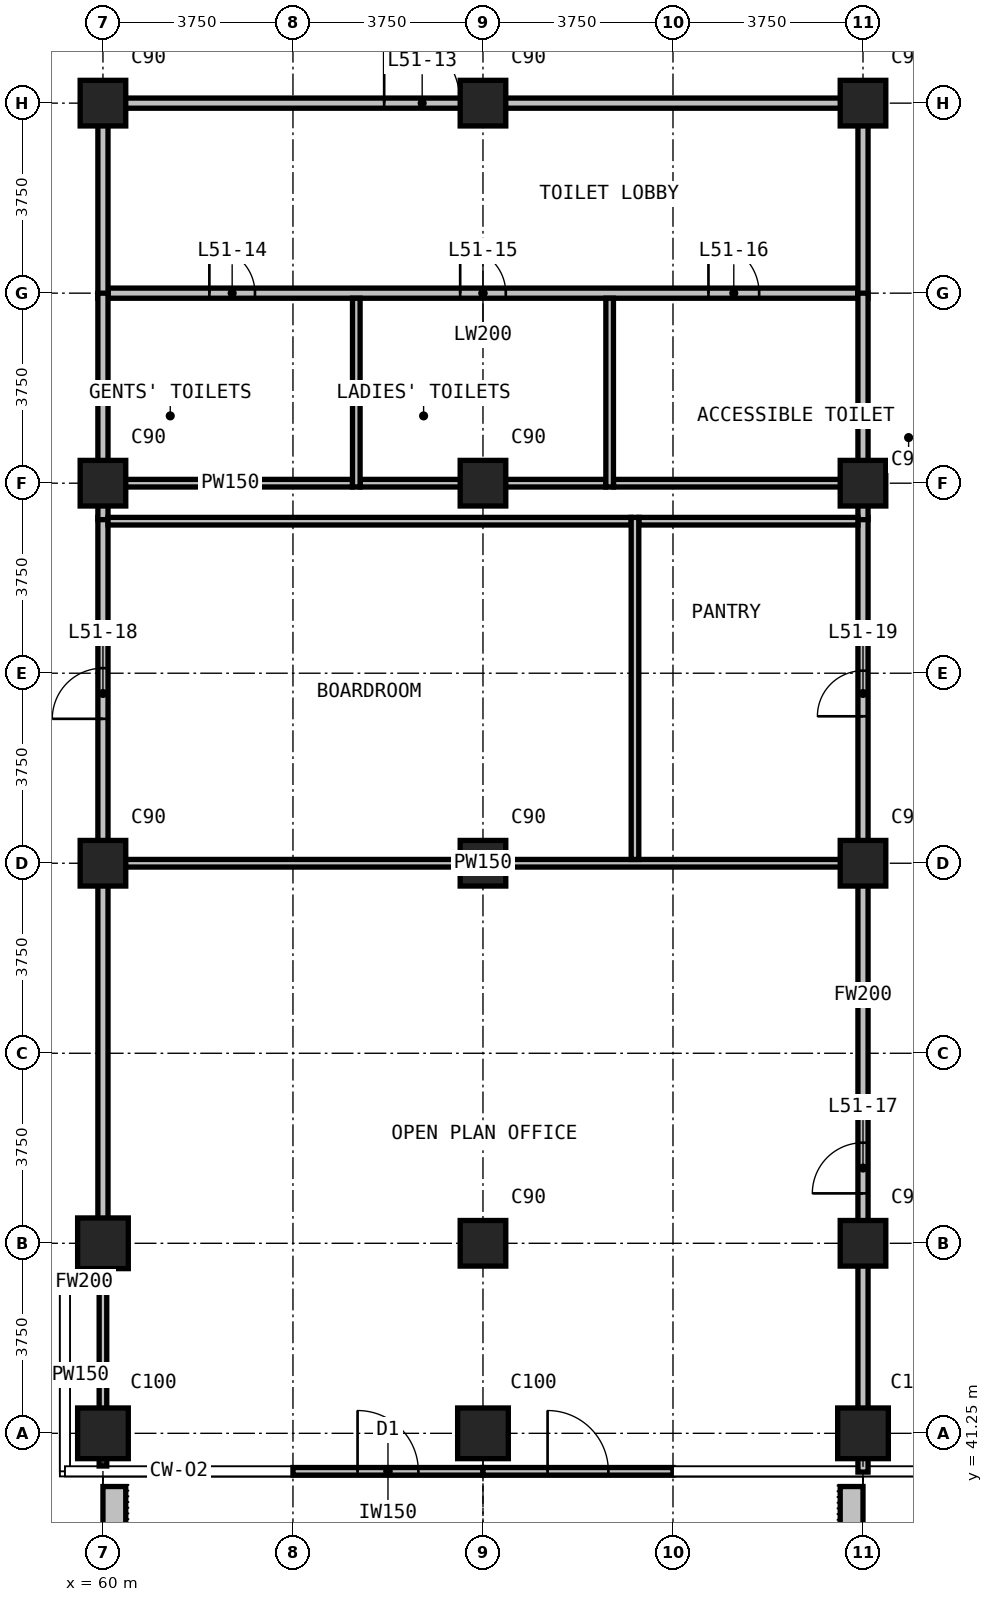
"""IFC4 building model, lengths in metres.
Left out: names, types, materials, properties, quantities, classifications, styles, units other than length and angle.
Written with IfcOpenShell. Run it as: python <this file> out.ifc"""

import sys

from ifc_helpers import new_model, si_unit, direction, frame, frame_2d, origin, origin_2d, place, context, subcontext, project, spatial, rectangle, extrude, element, fill, save


model = new_model("IFC4")
c1 = context("Model", 3, precision=1e-05, world=origin(), true_north=direction((0.0, 1.0)))
c2 = subcontext(c1, "Body", "Model", "MODEL_VIEW")
j1 = project(units=[si_unit("LENGTHUNIT", "METRE"), si_unit("PLANEANGLEUNIT", "RADIAN")], contexts=[c1])
p1 = place(None, origin())
s1 = spatial("IfcSite", under=j1, at=p1, CompositionType="ELEMENT")
p2 = place(p1, origin())
s2 = spatial("IfcBuilding", under=s1, at=p2, CompositionType="ELEMENT")
p3 = place(p2, frame((0.0, 0.0, 199.5)))
s3 = spatial("IfcBuildingStorey", under=s2, at=p3, CompositionType="ELEMENT", Elevation=199.5)
for number, where, z_axis, x_axis in (
    (1, (60.0, 41.25, 0.0), (0.0, 0.0, 1.0), (1.0, 0.0, 0.0)),
    (2, (60.0, 45.0, 0.0), (0.0, 0.0, 1.0), (1.0, 0.0, 0.0)),
):
    element("IfcColumn", number, at=place(p3, frame(where, z_axis=z_axis, x_axis=x_axis)), inside=s3, PredefinedType="COLUMN", context=c2, shape_type="SweptSolid", body=[
        extrude(rectangle(XDim=1.0, YDim=1.0, at=origin_2d()), origin(), (0.0, 0.0, 1.0), 3.6),
    ])
for number, where, z_axis, x_axis in (
    (3, (60.0, 52.5, 0.0), (0.0, 0.0, 1.0), (1.0, 0.0, 0.0)),
    (4, (60.0, 60.0, 0.0), (0.0, 0.0, 1.0), (1.0, 0.0, 0.0)),
    (5, (60.0, 67.5, 0.0), (0.0, 0.0, 1.0), (1.0, 0.0, 0.0)),
):
    element("IfcColumn", number, at=place(p3, frame(where, z_axis=z_axis, x_axis=x_axis)), inside=s3, PredefinedType="COLUMN", context=c2, shape_type="SweptSolid", body=[
        extrude(rectangle(XDim=0.9, YDim=0.9, at=origin_2d()), origin(), (0.0, 0.0, 1.0), 3.6),
    ])
p4 = place(p3, frame((67.5, 41.25, 0.0), z_axis=(0.0, 0.0, 1.0), x_axis=(1.0, 0.0, 0.0)))
e6 = element("IfcColumn", 6, at=p4, inside=s3, PredefinedType="COLUMN", context=c2, shape_type="SweptSolid", body=[
    extrude(rectangle(XDim=1.0, YDim=1.0, at=origin_2d()), origin(), (0.0, 0.0, 1.0), 3.6),
])
for number, where, z_axis, x_axis in (
    (7, (67.5, 45.0, 0.0), (0.0, 0.0, 1.0), (1.0, 0.0, 0.0)),
    (8, (67.5, 52.5, 0.0), (0.0, 0.0, 1.0), (1.0, 0.0, 0.0)),
    (9, (67.5, 60.0, 0.0), (0.0, 0.0, 1.0), (1.0, 0.0, 0.0)),
    (10, (67.5, 67.5, 0.0), (0.0, 0.0, 1.0), (1.0, 0.0, 0.0)),
):
    element("IfcColumn", number, at=place(p3, frame(where, z_axis=z_axis, x_axis=x_axis)), inside=s3, PredefinedType="COLUMN", context=c2, shape_type="SweptSolid", body=[
        extrude(rectangle(XDim=0.9, YDim=0.9, at=origin_2d()), origin(), (0.0, 0.0, 1.0), 3.6),
    ])
p5 = place(p3, frame((75.0, 41.25, 0.0), z_axis=(0.0, 0.0, 1.0), x_axis=(1.0, 0.0, 0.0)))
e11 = element("IfcColumn", 11, at=p5, inside=s3, PredefinedType="COLUMN", context=c2, shape_type="SweptSolid", body=[
    extrude(rectangle(XDim=1.0, YDim=1.0, at=origin_2d()), origin(), (0.0, 0.0, 1.0), 3.6),
])
for number, where, z_axis, x_axis in (
    (12, (75.0, 45.0, 0.0), (0.0, 0.0, 1.0), (1.0, 0.0, 0.0)),
    (13, (75.0, 52.5, 0.0), (0.0, 0.0, 1.0), (1.0, 0.0, 0.0)),
    (14, (75.0, 60.0, 0.0), (0.0, 0.0, 1.0), (1.0, 0.0, 0.0)),
    (15, (75.0, 67.5, 0.0), (0.0, 0.0, 1.0), (1.0, 0.0, 0.0)),
):
    element("IfcColumn", number, at=place(p3, frame(where, z_axis=z_axis, x_axis=x_axis)), inside=s3, PredefinedType="COLUMN", context=c2, shape_type="SweptSolid", body=[
        extrude(rectangle(XDim=0.9, YDim=0.9, at=origin_2d()), origin(), (0.0, 0.0, 1.0), 3.6),
    ])
p6 = place(p3, frame((63.75, 40.5, 0.0), z_axis=(0.0, 0.0, 1.0), x_axis=(1.0, 0.0, 0.0)))
e16 = element("IfcWall", 16, at=p6, inside=s3, PredefinedType="SOLIDWALL", context=c2, shape_type="SweptSolid", body=[
    extrude(rectangle(XDim=3.75, YDim=0.15, at=frame_2d((1.875, 0.0))), origin(), (0.0, 0.0, 1.0), 3.3),
])
p7 = place(p6, frame((1.275, 0.0, 0.0)))
e17 = element("IfcOpeningElement", 17, at=p7, cuts=e16, PredefinedType="OPENING", context=c2, shape_type="SweptSolid", body=[
    extrude(rectangle(XDim=1.2, YDim=2.4, at=frame_2d((0.6, 1.2))), frame((0.0, 0.085, 0.0), z_axis=(0.0, -1.0, 0.0), x_axis=(1.0, 0.0, 0.0)), (0.0, 0.0, 1.0), 0.17),
])
p8 = place(p3, frame((67.5, 40.5, 0.0), z_axis=(0.0, 0.0, 1.0), x_axis=(1.0, 0.0, 0.0)))
e18 = element("IfcWall", 18, at=p8, inside=s3, PredefinedType="SOLIDWALL", context=c2, shape_type="SweptSolid", body=[
    extrude(rectangle(XDim=3.75, YDim=0.15, at=frame_2d((1.875, 0.0))), origin(), (0.0, 0.0, 1.0), 3.3),
])
p9 = place(p8, frame((1.275, 0.0, 0.0)))
e19 = element("IfcOpeningElement", 19, at=p9, cuts=e18, PredefinedType="OPENING", context=c2, shape_type="SweptSolid", body=[
    extrude(rectangle(XDim=1.2, YDim=2.4, at=frame_2d((0.6, 1.2))), frame((0.0, 0.085, 0.0), z_axis=(0.0, -1.0, 0.0), x_axis=(1.0, 0.0, 0.0)), (0.0, 0.0, 1.0), 0.17),
])
for number, where, z_axis, x_axis in (
    (20, (60.225, 40.2, 0.0), (0.0, 0.0, 1.0), (0.0, -1.0, 0.0)),
    (21, (74.775, 40.2, 0.0), (0.0, 0.0, 1.0), (0.0, -1.0, 0.0)),
):
    element("IfcWall", number, at=place(p3, frame(where, z_axis=z_axis, x_axis=x_axis)), inside=s3, PredefinedType="USERDEFINED", context=c2, shape_type="SweptSolid", body=[
        extrude(rectangle(XDim=2.35, YDim=0.45, at=frame_2d((1.175, 0.0))), origin(), (0.0, 0.0, 1.0), 1.1),
    ])
p10 = place(p3, frame((60.1, 63.75, 0.0), z_axis=(0.0, 0.0, 1.0), x_axis=(1.0, 0.0, 0.0)))
e22 = element("IfcWall", 22, at=p10, inside=s3, PredefinedType="PARTITIONING", context=c2, shape_type="SweptSolid", body=[
    extrude(rectangle(XDim=14.8, YDim=0.2, at=frame_2d((7.4, 0.0))), origin(), (0.0, 0.0, 1.0), 3.3),
])
p11 = place(p10, frame((2.0, 0.0, 0.0)))
e23 = element("IfcOpeningElement", 23, at=p11, cuts=e22, PredefinedType="OPENING", context=c2, shape_type="SweptSolid", body=[
    extrude(rectangle(XDim=0.9, YDim=2.2, at=frame_2d((0.45, 1.1))), frame((0.0, 0.11, 0.0), z_axis=(0.0, -1.0, 0.0), x_axis=(1.0, 0.0, 0.0)), (0.0, 0.0, 1.0), 0.22),
])
p12 = place(p10, frame((6.95, 0.0, 0.0)))
e24 = element("IfcOpeningElement", 24, at=p12, cuts=e22, PredefinedType="OPENING", context=c2, shape_type="SweptSolid", body=[
    extrude(rectangle(XDim=0.9, YDim=2.2, at=frame_2d((0.45, 1.1))), frame((0.0, 0.11, 0.0), z_axis=(0.0, -1.0, 0.0), x_axis=(1.0, 0.0, 0.0)), (0.0, 0.0, 1.0), 0.22),
])
p13 = place(p10, frame((11.85, 0.0, 0.0)))
e25 = element("IfcOpeningElement", 25, at=p13, cuts=e22, PredefinedType="OPENING", context=c2, shape_type="SweptSolid", body=[
    extrude(rectangle(XDim=1.0, YDim=2.2, at=frame_2d((0.5, 1.1))), frame((0.0, 0.11, 0.0), z_axis=(0.0, -1.0, 0.0), x_axis=(1.0, 0.0, 0.0)), (0.0, 0.0, 1.0), 0.22),
])
p14 = place(p3, frame((60.1, 67.5, 0.0), z_axis=(0.0, 0.0, 1.0), x_axis=(1.0, 0.0, 0.0)))
e26 = element("IfcWall", 26, at=p14, inside=s3, PredefinedType="PARTITIONING", context=c2, shape_type="SweptSolid", body=[
    extrude(rectangle(XDim=14.8, YDim=0.2, at=frame_2d((7.4, 0.0))), origin(), (0.0, 0.0, 1.0), 3.3),
])
p15 = place(p14, frame((5.45, 0.0, 0.0)))
e27 = element("IfcOpeningElement", 27, at=p15, cuts=e26, PredefinedType="OPENING", context=c2, shape_type="SweptSolid", body=[
    extrude(rectangle(XDim=1.5, YDim=2.2, at=frame_2d((0.75, 1.1))), frame((0.0, 0.11, 0.0), z_axis=(0.0, -1.0, 0.0), x_axis=(1.0, 0.0, 0.0)), (0.0, 0.0, 1.0), 0.22),
])
for number, where, z_axis, x_axis in (
    (28, (60.0, 63.65, 0.0), (0.0, 0.0, 1.0), (0.0, 1.0, 0.0)),
    (29, (75.0, 63.65, 0.0), (0.0, 0.0, 1.0), (0.0, 1.0, 0.0)),
):
    element("IfcWall", number, at=place(p3, frame(where, z_axis=z_axis, x_axis=x_axis)), inside=s3, PredefinedType="PARTITIONING", context=c2, shape_type="SweptSolid", body=[
        extrude(rectangle(XDim=3.95, YDim=0.2, at=frame_2d((1.975, 0.0))), origin(), (0.0, 0.0, 1.0), 3.3),
    ])
p16 = place(p3, frame((59.355, 44.235, 0.0), z_axis=(0.0, 0.0, 1.0), x_axis=(1.0, 0.0, 0.0)))
e30 = element("IfcWall", 30, at=p16, inside=s3, PredefinedType="PARTITIONING", context=c2, shape_type="SweptSolid", body=[
    extrude(rectangle(XDim=0.545, YDim=0.2, at=frame_2d((0.272, 0.0))), origin(), (0.0, 0.0, 1.0), 3.3),
])
p17 = place(p3, frame((60.0, 44.135, 0.0), z_axis=(0.0, 0.0, 1.0), x_axis=(0.0, 1.0, 0.0)))
e31 = element("IfcWall", 31, at=p17, inside=s3, PredefinedType="PARTITIONING", context=c2, shape_type="SweptSolid", body=[
    extrude(rectangle(XDim=15.19, YDim=0.2, at=frame_2d((7.595, 0.0))), origin(), (0.0, 0.0, 1.0), 3.3),
])
p18 = place(p17, frame((11.215, 0.0, 0.0)))
e32 = element("IfcOpeningElement", 32, at=p18, cuts=e31, PredefinedType="OPENING", context=c2, shape_type="SweptSolid", body=[
    extrude(rectangle(XDim=1.0, YDim=2.2, at=frame_2d((0.5, 1.1))), frame((0.0, 0.11, 0.0), z_axis=(0.0, -1.0, 0.0), x_axis=(1.0, 0.0, 0.0)), (0.0, 0.0, 1.0), 0.22),
])
p19 = place(p3, frame((60.0, 59.28, 0.0), z_axis=(0.0, 0.0, 1.0), x_axis=(0.0, 1.0, 0.0)))
e33 = element("IfcWall", 33, at=p19, inside=s3, PredefinedType="PARTITIONING", context=c2, shape_type="SweptSolid", body=[
    extrude(rectangle(XDim=0.795, YDim=0.2, at=frame_2d((0.397, 0.0))), origin(), (0.0, 0.0, 1.0), 3.3),
])
p20 = place(p3, frame((60.0, 60.0, 0.0), z_axis=(0.0, 0.0, 1.0), x_axis=(0.0, 1.0, 0.0)))
e34 = element("IfcWall", 34, at=p20, inside=s3, PredefinedType="PARTITIONING", context=c2, shape_type="SweptSolid", body=[
    extrude(rectangle(XDim=3.75, YDim=0.2, at=frame_2d((1.875, 0.0))), origin(), (0.0, 0.0, 1.0), 3.3),
])
p21 = place(p3, frame((75.0, 40.485, 0.0), z_axis=(0.0, 0.0, 1.0), x_axis=(0.0, 1.0, 0.0)))
e35 = element("IfcWall", 35, at=p21, inside=s3, PredefinedType="PARTITIONING", context=c2, shape_type="SweptSolid", body=[
    extrude(rectangle(XDim=18.84, YDim=0.2, at=frame_2d((9.42, 0.0))), origin(), (0.0, 0.0, 1.0), 3.3),
])
p22 = place(p21, frame((5.5, 0.0, 0.0)))
e36 = element("IfcOpeningElement", 36, at=p22, cuts=e35, PredefinedType="OPENING", context=c2, shape_type="SweptSolid", body=[
    extrude(rectangle(XDim=1.0, YDim=2.2, at=frame_2d((0.5, 1.1))), frame((0.0, 0.11, 0.0), z_axis=(0.0, -1.0, 0.0), x_axis=(1.0, 0.0, 0.0)), (0.0, 0.0, 1.0), 0.22),
])
p23 = place(p21, frame((14.915, 0.0, 0.0)))
e37 = element("IfcOpeningElement", 37, at=p23, cuts=e35, PredefinedType="OPENING", context=c2, shape_type="SweptSolid", body=[
    extrude(rectangle(XDim=0.9, YDim=2.2, at=frame_2d((0.45, 1.1))), frame((0.0, 0.11, 0.0), z_axis=(0.0, -1.0, 0.0), x_axis=(1.0, 0.0, 0.0)), (0.0, 0.0, 1.0), 0.22),
])
p24 = place(p3, frame((75.0, 59.28, 0.0), z_axis=(0.0, 0.0, 1.0), x_axis=(0.0, 1.0, 0.0)))
e38 = element("IfcWall", 38, at=p24, inside=s3, PredefinedType="PARTITIONING", context=c2, shape_type="SweptSolid", body=[
    extrude(rectangle(XDim=0.795, YDim=0.2, at=frame_2d((0.397, 0.0))), origin(), (0.0, 0.0, 1.0), 3.3),
])
p25 = place(p3, frame((75.0, 60.0, 0.0), z_axis=(0.0, 0.0, 1.0), x_axis=(0.0, 1.0, 0.0)))
e39 = element("IfcWall", 39, at=p25, inside=s3, PredefinedType="PARTITIONING", context=c2, shape_type="SweptSolid", body=[
    extrude(rectangle(XDim=3.75, YDim=0.2, at=frame_2d((1.875, 0.0))), origin(), (0.0, 0.0, 1.0), 3.3),
])
p26 = place(p3, frame((60.1, 52.5, 0.0), z_axis=(0.0, 0.0, 1.0), x_axis=(1.0, 0.0, 0.0)))
e40 = element("IfcWall", 40, at=p26, inside=s3, PredefinedType="PARTITIONING", context=c2, shape_type="SweptSolid", body=[
    extrude(rectangle(XDim=14.8, YDim=0.15, at=frame_2d((7.4, 0.0))), origin(), (0.0, 0.0, 1.0), 3.3),
])
p27 = place(p3, frame((60.1, 59.25, 0.0), z_axis=(0.0, 0.0, 1.0), x_axis=(1.0, 0.0, 0.0)))
e41 = element("IfcWall", 41, at=p27, inside=s3, PredefinedType="PARTITIONING", context=c2, shape_type="SweptSolid", body=[
    extrude(rectangle(XDim=10.325, YDim=0.15, at=frame_2d((5.163, 0.0))), origin(), (0.0, 0.0, 1.0), 3.3),
])
p28 = place(p3, frame((70.575, 59.25, 0.0), z_axis=(0.0, 0.0, 1.0), x_axis=(1.0, 0.0, 0.0)))
e42 = element("IfcWall", 42, at=p28, inside=s3, PredefinedType="PARTITIONING", context=c2, shape_type="SweptSolid", body=[
    extrude(rectangle(XDim=4.325, YDim=0.15, at=frame_2d((2.163, 0.0))), origin(), (0.0, 0.0, 1.0), 3.3),
])
p29 = place(p3, frame((60.1, 60.0, 0.0), z_axis=(0.0, 0.0, 1.0), x_axis=(1.0, 0.0, 0.0)))
e43 = element("IfcWall", 43, at=p29, inside=s3, PredefinedType="PARTITIONING", context=c2, shape_type="SweptSolid", body=[
    extrude(rectangle(XDim=4.825, YDim=0.15, at=frame_2d((2.413, 0.0))), origin(), (0.0, 0.0, 1.0), 3.3),
])
p30 = place(p3, frame((65.075, 60.0, 0.0), z_axis=(0.0, 0.0, 1.0), x_axis=(1.0, 0.0, 0.0)))
e44 = element("IfcWall", 44, at=p30, inside=s3, PredefinedType="PARTITIONING", context=c2, shape_type="SweptSolid", body=[
    extrude(rectangle(XDim=4.85, YDim=0.15, at=frame_2d((2.425, 0.0))), origin(), (0.0, 0.0, 1.0), 3.3),
])
p31 = place(p3, frame((70.075, 60.0, 0.0), z_axis=(0.0, 0.0, 1.0), x_axis=(1.0, 0.0, 0.0)))
e45 = element("IfcWall", 45, at=p31, inside=s3, PredefinedType="PARTITIONING", context=c2, shape_type="SweptSolid", body=[
    extrude(rectangle(XDim=4.825, YDim=0.15, at=frame_2d((2.413, 0.0))), origin(), (0.0, 0.0, 1.0), 3.3),
])
p32 = place(p3, frame((60.0, 40.605, 0.0), z_axis=(0.0, 0.0, 1.0), x_axis=(0.0, 1.0, 0.0)))
e46 = element("IfcWall", 46, at=p32, inside=s3, PredefinedType="PARTITIONING", context=c2, shape_type="SweptSolid", body=[
    extrude(rectangle(XDim=3.6, YDim=0.15, at=frame_2d((1.8, 0.0))), origin(), (0.0, 0.0, 1.0), 3.3),
])
for number, where, z_axis, x_axis in (
    (47, (65.0, 59.925, 0.0), (0.0, 0.0, 1.0), (0.0, 1.0, 0.0)),
    (48, (70.0, 59.925, 0.0), (0.0, 0.0, 1.0), (0.0, 1.0, 0.0)),
):
    element("IfcWall", number, at=place(p3, frame(where, z_axis=z_axis, x_axis=x_axis)), inside=s3, PredefinedType="PARTITIONING", context=c2, shape_type="SweptSolid", body=[
        extrude(rectangle(XDim=3.725, YDim=0.15, at=frame_2d((1.862, 0.0))), origin(), (0.0, 0.0, 1.0), 3.3),
    ])
p33 = place(p3, frame((70.5, 52.575, 0.0), z_axis=(0.0, 0.0, 1.0), x_axis=(0.0, 1.0, 0.0)))
e49 = element("IfcWall", 49, at=p33, inside=s3, PredefinedType="PARTITIONING", context=c2, shape_type="SweptSolid", body=[
    extrude(rectangle(XDim=6.75, YDim=0.15, at=frame_2d((3.375, 0.0))), origin(), (0.0, 0.0, 1.0), 3.3),
])
p34 = place(p7, origin())
e50 = element("IfcDoor", 50, at=p34, inside=s3, OperationType="SINGLE_SWING_LEFT", PredefinedType="DOOR", context=c2, shape_type="SweptSolid", body=[
    extrude(rectangle(XDim=1.2, YDim=2.4, at=frame_2d((0.6, 1.2))), frame((0.0, 0.025, 0.0), z_axis=(0.0, -1.0, 0.0), x_axis=(1.0, 0.0, 0.0)), (0.0, 0.0, 1.0), 0.05),
])
fill(e17, e50)
p35 = place(p9, origin())
e51 = element("IfcDoor", 51, at=p35, inside=s3, OperationType="SINGLE_SWING_LEFT", PredefinedType="DOOR", context=c2, shape_type="SweptSolid", body=[
    extrude(rectangle(XDim=1.2, YDim=2.4, at=frame_2d((0.6, 1.2))), frame((0.0, 0.025, 0.0), z_axis=(0.0, -1.0, 0.0), x_axis=(1.0, 0.0, 0.0)), (0.0, 0.0, 1.0), 0.05),
])
fill(e19, e51)
p36 = place(p15, origin())
e52 = element("IfcDoor", 52, at=p36, inside=s3, OperationType="DOUBLE_DOOR_SINGLE_SWING", PredefinedType="DOOR", context=c2, shape_type="SweptSolid", body=[
    extrude(rectangle(XDim=1.5, YDim=2.2, at=frame_2d((0.75, 1.1))), frame((0.0, 0.025, 0.0), z_axis=(0.0, -1.0, 0.0), x_axis=(1.0, 0.0, 0.0)), (0.0, 0.0, 1.0), 0.05),
])
fill(e27, e52)
p37 = place(p11, origin())
e53 = element("IfcDoor", 53, at=p37, inside=s3, OperationType="SINGLE_SWING_LEFT", PredefinedType="DOOR", context=c2, shape_type="SweptSolid", body=[
    extrude(rectangle(XDim=0.9, YDim=2.2, at=frame_2d((0.45, 1.1))), frame((0.0, 0.025, 0.0), z_axis=(0.0, -1.0, 0.0), x_axis=(1.0, 0.0, 0.0)), (0.0, 0.0, 1.0), 0.05),
])
fill(e23, e53)
p38 = place(p12, origin())
e54 = element("IfcDoor", 54, at=p38, inside=s3, OperationType="SINGLE_SWING_RIGHT", PredefinedType="DOOR", context=c2, shape_type="SweptSolid", body=[
    extrude(rectangle(XDim=0.9, YDim=2.2, at=frame_2d((0.45, 1.1))), frame((0.0, 0.025, 0.0), z_axis=(0.0, -1.0, 0.0), x_axis=(1.0, 0.0, 0.0)), (0.0, 0.0, 1.0), 0.05),
])
fill(e24, e54)
p39 = place(p13, origin())
e55 = element("IfcDoor", 55, at=p39, inside=s3, OperationType="SINGLE_SWING_LEFT", PredefinedType="DOOR", context=c2, shape_type="SweptSolid", body=[
    extrude(rectangle(XDim=1.0, YDim=2.2, at=frame_2d((0.5, 1.1))), frame((0.0, 0.025, 0.0), z_axis=(0.0, -1.0, 0.0), x_axis=(1.0, 0.0, 0.0)), (0.0, 0.0, 1.0), 0.05),
])
fill(e25, e55)
p40 = place(p22, origin())
e56 = element("IfcDoor", 56, at=p40, inside=s3, OperationType="SINGLE_SWING_LEFT", PredefinedType="DOOR", context=c2, shape_type="SweptSolid", body=[
    extrude(rectangle(XDim=1.0, YDim=2.2, at=frame_2d((0.5, 1.1))), frame((0.0, 0.025, 0.0), z_axis=(0.0, -1.0, 0.0), x_axis=(1.0, 0.0, 0.0)), (0.0, 0.0, 1.0), 0.05),
])
fill(e36, e56)
p41 = place(p18, origin())
e57 = element("IfcDoor", 57, at=p41, inside=s3, OperationType="SINGLE_SWING_RIGHT", PredefinedType="DOOR", context=c2, shape_type="SweptSolid", body=[
    extrude(rectangle(XDim=1.0, YDim=2.2, at=frame_2d((0.5, 1.1))), frame((0.0, 0.025, 0.0), z_axis=(0.0, -1.0, 0.0), x_axis=(1.0, 0.0, 0.0)), (0.0, 0.0, 1.0), 0.05),
])
fill(e32, e57)
p42 = place(p23, origin())
e58 = element("IfcDoor", 58, at=p42, inside=s3, OperationType="SINGLE_SWING_LEFT", PredefinedType="DOOR", context=c2, shape_type="SweptSolid", body=[
    extrude(rectangle(XDim=0.9, YDim=2.2, at=frame_2d((0.45, 1.1))), frame((0.0, 0.025, 0.0), z_axis=(0.0, -1.0, 0.0), x_axis=(1.0, 0.0, 0.0)), (0.0, 0.0, 1.0), 0.05),
])
fill(e37, e58)
save(model, sys.argv[1])
